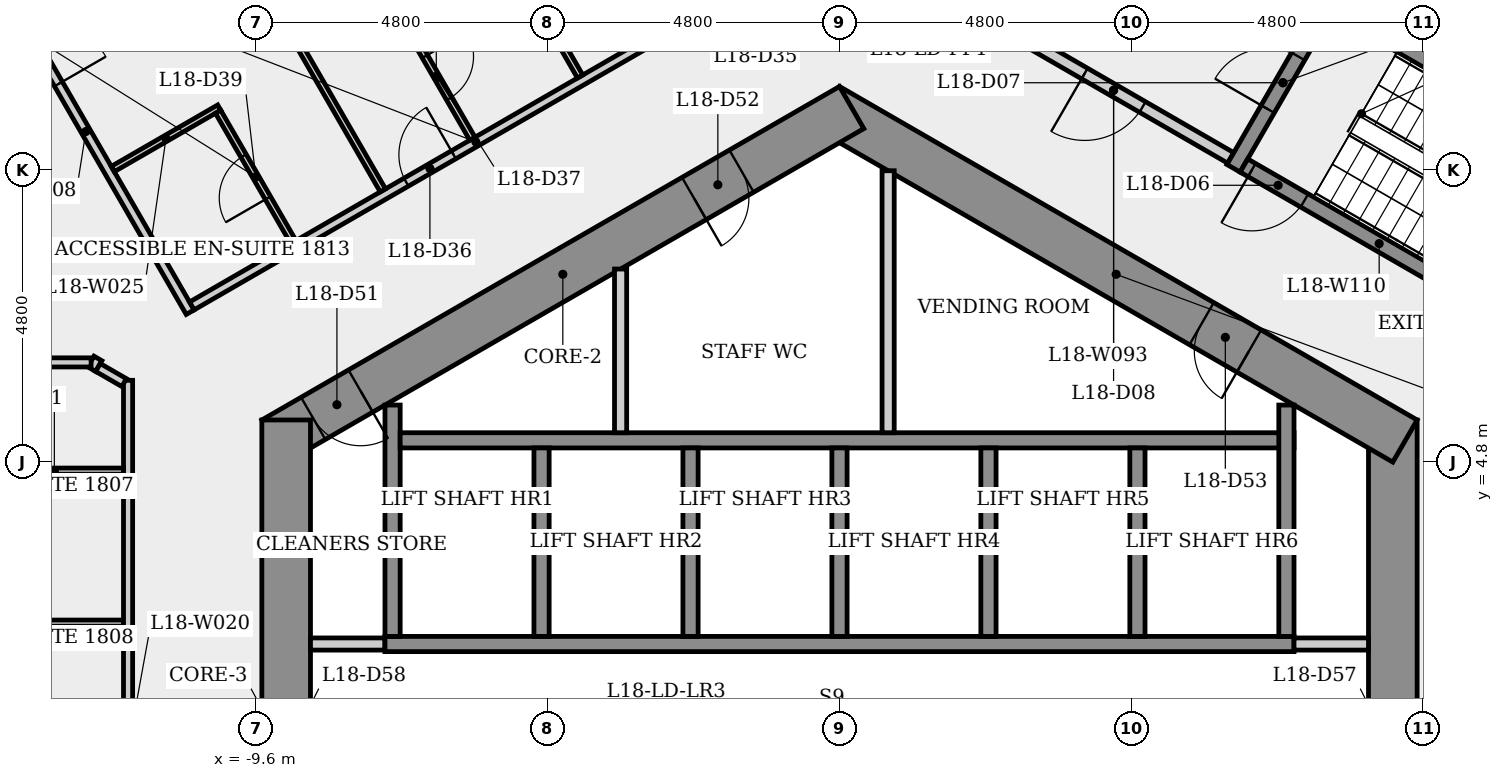
"""IFC4 building model, lengths in metres.
Left out: names, types, materials, properties, quantities, classifications, styles, units other than length and angle.
Written with IfcOpenShell. Run it as: python <this file> out.ifc"""

import sys

from ifc_helpers import new_model, si_unit, direction, frame, frame_2d, origin, place, context, subcontext, project, spatial, rectangle, extrude, element, fill, save


model = new_model("IFC4")
c1 = context("Model", 3, precision=1e-05, world=origin(), true_north=direction((0.0, 1.0)))
c2 = subcontext(c1, "Body", "Model", "MODEL_VIEW")
j1 = project(units=[si_unit("LENGTHUNIT", "METRE"), si_unit("PLANEANGLEUNIT", "RADIAN")], contexts=[c1])
p1 = place(None, origin())
s1 = spatial("IfcSite", under=j1, at=p1, CompositionType="ELEMENT")
p2 = place(p1, origin())
s2 = spatial("IfcBuilding", under=s1, at=p2, CompositionType="ELEMENT")
p3 = place(p2, frame((0.0, 0.0, 70.3)))
s3 = spatial("IfcBuildingStorey", under=s2, at=p3, CompositionType="ELEMENT", Elevation=70.3)
p4 = place(p3, frame((9.1, -5.485, 0.0), z_axis=(0.0, 0.0, 1.0), x_axis=(0.0, 1.0, 0.0)))
e1 = element("IfcWall", 1, at=p4, inside=s3, PredefinedType="SHEAR", context=c2, shape_type="SweptSolid", body=[
    extrude(rectangle(XDim=10.97, YDim=0.8, at=frame_2d((5.485, 0.0))), origin(), (0.0, 0.0, 1.0), 4.0),
])
p5 = place(p4, frame((4.685, 0.0, 0.0)))
e2 = element("IfcOpeningElement", 2, at=p5, cuts=e1, PredefinedType="OPENING", context=c2, shape_type="SweptSolid", body=[
    extrude(rectangle(XDim=1.6, YDim=2.1, at=frame_2d((0.8, 1.05))), frame((0.0, 0.41, 0.0), z_axis=(0.0, -1.0, 0.0), x_axis=(1.0, 0.0, 0.0)), (0.0, 0.0, 1.0), 0.82),
])
p6 = place(p3, frame((9.3, 5.138, 0.0), z_axis=(0.0, 0.0, 1.0), x_axis=(-0.866023993627, 0.500002442456, 0.0)))
e3 = element("IfcWall", 3, at=p6, inside=s3, PredefinedType="SHEAR", context=c2, shape_type="SweptSolid", body=[
    extrude(rectangle(XDim=10.97, YDim=0.8, at=frame_2d((5.485, 0.0))), origin(), (0.0, 0.0, 1.0), 4.0),
])
p7 = place(p6, frame((2.962, 0.0, 0.0)))
e4 = element("IfcOpeningElement", 4, at=p7, cuts=e3, PredefinedType="OPENING", context=c2, shape_type="SweptSolid", body=[
    extrude(rectangle(XDim=0.9, YDim=2.1, at=frame_2d((0.45, 1.05))), frame((0.0, 0.41, 0.0), z_axis=(0.0, -1.0, 0.0), x_axis=(1.0, 0.0, 0.0)), (0.0, 0.0, 1.0), 0.82),
])
p8 = place(p3, frame((0.2, 10.623, 0.0), z_axis=(0.0, 0.0, 1.0), x_axis=(-0.866023993627, -0.500002442456, 0.0)))
e5 = element("IfcWall", 5, at=p8, inside=s3, PredefinedType="SHEAR", context=c2, shape_type="SweptSolid", body=[
    extrude(rectangle(XDim=10.97, YDim=0.8, at=frame_2d((5.485, 0.0))), origin(), (0.0, 0.0, 1.0), 4.0),
])
p9 = place(p8, frame((9.325, 0.0, 0.0)))
e6 = element("IfcOpeningElement", 6, at=p9, cuts=e5, PredefinedType="OPENING", context=c2, shape_type="SweptSolid", body=[
    extrude(rectangle(XDim=0.9, YDim=2.1, at=frame_2d((0.45, 1.05))), frame((0.0, 0.41, 0.0), z_axis=(0.0, -1.0, 0.0), x_axis=(1.0, 0.0, 0.0)), (0.0, 0.0, 1.0), 0.82),
])
p10 = place(p8, frame((2.091, 0.0, 0.0)))
e7 = element("IfcOpeningElement", 7, at=p10, cuts=e5, PredefinedType="OPENING", context=c2, shape_type="SweptSolid", body=[
    extrude(rectangle(XDim=0.9, YDim=2.1, at=frame_2d((0.45, 1.05))), frame((0.0, 0.41, 0.0), z_axis=(0.0, -1.0, 0.0), x_axis=(1.0, 0.0, 0.0)), (0.0, 0.0, 1.0), 0.82),
])
p11 = place(p3, frame((-9.1, 5.485, 0.0), z_axis=(0.0, 0.0, 1.0), x_axis=(0.0, -1.0, 0.0)))
e8 = element("IfcWall", 8, at=p11, inside=s3, PredefinedType="SHEAR", context=c2, shape_type="SweptSolid", body=[
    extrude(rectangle(XDim=10.97, YDim=0.8, at=frame_2d((5.485, 0.0))), origin(), (0.0, 0.0, 1.0), 4.0),
])
p12 = place(p11, frame((4.685, 0.0, 0.0)))
e9 = element("IfcOpeningElement", 9, at=p12, cuts=e8, PredefinedType="OPENING", context=c2, shape_type="SweptSolid", body=[
    extrude(rectangle(XDim=1.6, YDim=2.1, at=frame_2d((0.8, 1.05))), frame((0.0, 0.41, 0.0), z_axis=(0.0, -1.0, 0.0), x_axis=(1.0, 0.0, 0.0)), (0.0, 0.0, 1.0), 0.82),
])
p13 = place(p3, frame((-14.11, 13.2, 0.0), z_axis=(0.0, 0.0, 1.0), x_axis=(0.500007857356, -0.866020867291, 0.0)))
e10 = element("IfcWall", 10, at=p13, inside=s3, PredefinedType="PARTITIONING", context=c2, shape_type="SweptSolid", body=[
    extrude(rectangle(XDim=6.862, YDim=0.15, at=frame_2d((3.431, 0.0))), origin(), (0.0, 0.0, 1.0), 3.6),
])
p14 = place(p13, frame((1.628, 0.0, 0.0)))
e11 = element("IfcOpeningElement", 11, at=p14, cuts=e10, PredefinedType="OPENING", context=c2, shape_type="SweptSolid", body=[
    extrude(rectangle(XDim=0.9, YDim=2.1, at=frame_2d((0.45, 1.05))), frame((0.0, 0.085, 0.0), z_axis=(0.0, -1.0, 0.0), x_axis=(1.0, 0.0, 0.0)), (0.0, 0.0, 1.0), 0.17),
])
p15 = place(p3, frame((-20.003, 2.144, 0.0), z_axis=(0.0, 0.0, 1.0), x_axis=(1.0, 0.0, 0.0)))
e12 = element("IfcWall", 12, at=p15, inside=s3, PredefinedType="PARTITIONING", context=c2, shape_type="SweptSolid", body=[
    extrude(rectangle(XDim=8.228, YDim=0.1, at=frame_2d((4.114, 0.0))), origin(), (0.0, 0.0, 1.0), 3.6),
])
p16 = place(p3, frame((-12.297, 6.32, 0.0), z_axis=(0.0, 0.0, 1.0), x_axis=(0.500137716533, 0.865945878506, 0.0)))
e13 = element("IfcWall", 13, at=p16, inside=s3, PredefinedType="PARTITIONING", context=c2, shape_type="SweptSolid", body=[
    extrude(rectangle(XDim=0.204, YDim=0.15, at=frame_2d((0.102, 0.0))), origin(), (0.0, 0.0, 1.0), 3.6),
])
p17 = place(p3, frame((-12.308, 6.432, 0.0), z_axis=(0.0, 0.0, 1.0), x_axis=(-1.0, 0.0, 0.0)))
e14 = element("IfcWall", 14, at=p17, inside=s3, PredefinedType="PARTITIONING", context=c2, shape_type="SweptSolid", body=[
    extrude(rectangle(XDim=5.709, YDim=0.15, at=frame_2d((2.855, 0.0))), origin(), (0.0, 0.0, 1.0), 3.6),
])
p18 = place(p17, frame((2.405, 0.0, 0.0)))
e15 = element("IfcOpeningElement", 15, at=p18, cuts=e14, PredefinedType="OPENING", context=c2, shape_type="SweptSolid", body=[
    extrude(rectangle(XDim=0.9, YDim=2.1, at=frame_2d((0.45, 1.05))), frame((0.0, 0.085, 0.0), z_axis=(0.0, -1.0, 0.0), x_axis=(1.0, 0.0, 0.0)), (0.0, 0.0, 1.0), 0.17),
])
p19 = place(p3, frame((-11.7, 6.137, 0.0), z_axis=(0.0, 0.0, 1.0), x_axis=(0.0, -1.0, 0.0)))
e16 = element("IfcWall", 16, at=p19, inside=s3, PredefinedType="PARTITIONING", context=c2, shape_type="SweptSolid", body=[
    extrude(rectangle(XDim=12.125, YDim=0.15, at=frame_2d((6.062, 0.0))), origin(), (0.0, 0.0, 1.0), 3.6),
])
p20 = place(p19, frame((6.937, 0.0, 0.0)))
e17 = element("IfcOpeningElement", 17, at=p20, cuts=e16, PredefinedType="OPENING", context=c2, shape_type="SweptSolid", body=[
    extrude(rectangle(XDim=0.9, YDim=2.1, at=frame_2d((0.45, 1.05))), frame((0.0, 0.085, 0.0), z_axis=(0.0, -1.0, 0.0), x_axis=(1.0, 0.0, 0.0)), (0.0, 0.0, 1.0), 0.17),
])
p21 = place(p3, frame((-11.775, 4.644, 0.0), z_axis=(0.0, 0.0, 1.0), x_axis=(-1.0, 0.0, 0.0)))
e18 = element("IfcWall", 18, at=p21, inside=s3, PredefinedType="PARTITIONING", context=c2, shape_type="SweptSolid", body=[
    extrude(rectangle(XDim=2.275, YDim=0.1, at=frame_2d((1.138, 0.0))), origin(), (0.0, 0.0, 1.0), 3.6),
])
p22 = place(p3, frame((-11.765, 6.1, 0.0), z_axis=(0.0, 0.0, 1.0), x_axis=(-0.865964461276, 0.500105540669, 0.0)))
e19 = element("IfcWall", 19, at=p22, inside=s3, PredefinedType="PARTITIONING", context=c2, shape_type="SweptSolid", body=[
    extrude(rectangle(XDim=0.497, YDim=0.15, at=frame_2d((0.248, 0.0))), origin(), (0.0, 0.0, 1.0), 3.6),
])
p23 = place(p3, frame((-10.651, 7.361, 0.0), z_axis=(0.0, 0.0, 1.0), x_axis=(0.866029938532, 0.499992145504, 0.0)))
e20 = element("IfcWall", 20, at=p23, inside=s3, PredefinedType="PARTITIONING", context=c2, shape_type="SweptSolid", body=[
    extrude(rectangle(XDim=10.788, YDim=0.15, at=frame_2d((5.394, 0.0))), origin(), (0.0, 0.0, 1.0), 3.6),
])
p24 = place(p23, frame((4.071, 0.0, 0.0)))
e21 = element("IfcOpeningElement", 21, at=p24, cuts=e20, PredefinedType="OPENING", context=c2, shape_type="SweptSolid", body=[
    extrude(rectangle(XDim=0.9, YDim=2.1, at=frame_2d((0.45, 1.05))), frame((0.0, 0.085, 0.0), z_axis=(0.0, -1.0, 0.0), x_axis=(1.0, 0.0, 0.0)), (0.0, 0.0, 1.0), 0.17),
])
p25 = place(p3, frame((-10.201, 10.623, 0.0), z_axis=(0.0, 0.0, 1.0), x_axis=(-0.866026663364, -0.499997818338, 0.0)))
e22 = element("IfcWall", 22, at=p25, inside=s3, PredefinedType="PARTITIONING", context=c2, shape_type="SweptSolid", body=[
    extrude(rectangle(XDim=2.021, YDim=0.1, at=frame_2d((1.01, 0.0))), origin(), (0.0, 0.0, 1.0), 3.6),
])
p26 = place(p3, frame((-8.982, 8.411, 0.0), z_axis=(0.0, 0.0, 1.0), x_axis=(-0.4999899861, 0.866031185235, 0.0)))
e23 = element("IfcWall", 23, at=p26, inside=s3, PredefinedType="PARTITIONING", context=c2, shape_type="SweptSolid", body=[
    extrude(rectangle(XDim=2.475, YDim=0.1, at=frame_2d((1.238, 0.0))), origin(), (0.0, 0.0, 1.0), 3.6),
])
p27 = place(p26, frame((0.837, 0.0, 0.0)))
e24 = element("IfcOpeningElement", 24, at=p27, cuts=e23, PredefinedType="OPENING", context=c2, shape_type="SweptSolid", body=[
    extrude(rectangle(XDim=0.8, YDim=2.1, at=frame_2d((0.4, 1.05))), frame((0.0, 0.06, 0.0), z_axis=(0.0, -1.0, 0.0), x_axis=(1.0, 0.0, 0.0)), (0.0, 0.0, 1.0), 0.12),
])
p28 = place(p3, frame((-8.7, 1.8, 0.0), z_axis=(0.0, 0.0, 1.0), x_axis=(1.0, 0.0, 0.0)))
e25 = element("IfcWall", 25, at=p28, inside=s3, PredefinedType="PARTITIONING", context=c2, shape_type="SweptSolid", body=[
    extrude(rectangle(XDim=1.225, YDim=0.2, at=frame_2d((0.613, 0.0))), origin(), (0.0, 0.0, 1.0), 3.6),
])
p29 = place(p3, frame((-7.51, 9.261, 0.0), z_axis=(0.0, 0.0, 1.0), x_axis=(-0.500009404554, 0.866019973994, 0.0)))
e26 = element("IfcWall", 26, at=p29, inside=s3, PredefinedType="PARTITIONING", context=c2, shape_type="SweptSolid", body=[
    extrude(rectangle(XDim=9.01, YDim=0.1, at=frame_2d((4.505, 0.0))), origin(), (0.0, 0.0, 1.0), 3.6),
])
p30 = place(p3, frame((-7.475, 1.8, 0.0), z_axis=(0.0, 0.0, 1.0), x_axis=(1.0, 0.0, 0.0)))
e27 = element("IfcWall", 27, at=p30, inside=s3, PredefinedType="SHEAR", context=c2, shape_type="SweptSolid", body=[
    extrude(rectangle(XDim=14.95, YDim=0.25, at=frame_2d((7.475, 0.0))), origin(), (0.0, 0.0, 1.0), 3.6),
])
p31 = place(p3, frame((-7.35, 1.925, 0.0), z_axis=(0.0, 0.0, 1.0), x_axis=(0.0, 1.0, 0.0)))
e28 = element("IfcWall", 28, at=p31, inside=s3, PredefinedType="SHEAR", context=c2, shape_type="SweptSolid", body=[
    extrude(rectangle(XDim=3.805, YDim=0.25, at=frame_2d((1.903, 0.0))), origin(), (0.0, 0.0, 1.0), 3.6),
])
p32 = place(p3, frame((-7.225, 5.15, 0.0), z_axis=(0.0, 0.0, 1.0), x_axis=(1.0, 0.0, 0.0)))
e29 = element("IfcWall", 29, at=p32, inside=s3, PredefinedType="SHEAR", context=c2, shape_type="SweptSolid", body=[
    extrude(rectangle(XDim=14.7, YDim=0.25, at=frame_2d((7.35, 0.0))), origin(), (0.0, 0.0, 1.0), 3.6),
])
p33 = place(p3, frame((-7.225, 12.168, 0.0), z_axis=(0.0, 0.0, 1.0), x_axis=(0.500030943131, -0.866007538022, 0.0)))
e30 = element("IfcWall", 30, at=p33, inside=s3, PredefinedType="PARTITIONING", context=c2, shape_type="SweptSolid", body=[
    extrude(rectangle(XDim=2.375, YDim=0.1, at=frame_2d((1.188, 0.0))), origin(), (0.0, 0.0, 1.0), 3.6),
])
p34 = place(p33, frame((0.812, 0.0, 0.0)))
e31 = element("IfcOpeningElement", 31, at=p34, cuts=e30, PredefinedType="OPENING", context=c2, shape_type="SweptSolid", body=[
    extrude(rectangle(XDim=0.8, YDim=2.1, at=frame_2d((0.4, 1.05))), frame((0.0, 0.06, 0.0), z_axis=(0.0, -1.0, 0.0), x_axis=(1.0, 0.0, 0.0)), (0.0, 0.0, 1.0), 0.12),
])
p35 = place(p3, frame((-8.77, 18.937, 0.0), z_axis=(0.0, 0.0, 1.0), x_axis=(0.499997670926, -0.866026748472, 0.0)))
e32 = element("IfcWall", 32, at=p35, inside=s3, PredefinedType="PARTITIONING", context=c2, shape_type="SweptSolid", body=[
    extrude(rectangle(XDim=9.01, YDim=0.1, at=frame_2d((4.505, 0.0))), origin(), (0.0, 0.0, 1.0), 3.6),
])
p36 = place(p3, frame((-4.9, 5.025, 0.0), z_axis=(0.0, 0.0, 1.0), x_axis=(0.0, -1.0, 0.0)))
e33 = element("IfcWall", 33, at=p36, inside=s3, PredefinedType="SHEAR", context=c2, shape_type="SweptSolid", body=[
    extrude(rectangle(XDim=3.1, YDim=0.25, at=frame_2d((1.55, 0.0))), origin(), (0.0, 0.0, 1.0), 4.0),
])
p37 = place(p3, frame((-3.6, 7.967, 0.0), z_axis=(0.0, 0.0, 1.0), x_axis=(0.0, -1.0, 0.0)))
e34 = element("IfcWall", 34, at=p37, inside=s3, PredefinedType="PARTITIONING", context=c2, shape_type="SweptSolid", body=[
    extrude(rectangle(XDim=2.692, YDim=0.2, at=frame_2d((1.346, 0.0))), origin(), (0.0, 0.0, 1.0), 3.6),
])
for number, where, z_axis, x_axis in (
    (35, (-2.45, 5.025, 0.0), (0.0, 0.0, 1.0), (0.0, -1.0, 0.0)),
    (36, (0.0, 5.025, 0.0), (0.0, 0.0, 1.0), (0.0, -1.0, 0.0)),
):
    element("IfcWall", number, at=place(p3, frame(where, z_axis=z_axis, x_axis=x_axis)), inside=s3, PredefinedType="SHEAR", context=c2, shape_type="SweptSolid", body=[
        extrude(rectangle(XDim=3.1, YDim=0.25, at=frame_2d((1.55, 0.0))), origin(), (0.0, 0.0, 1.0), 4.0),
    ])
p38 = place(p3, frame((0.8, 9.584, 0.0), z_axis=(0.0, 0.0, 1.0), x_axis=(0.0, -1.0, 0.0)))
e37 = element("IfcWall", 37, at=p38, inside=s3, PredefinedType="PARTITIONING", context=c2, shape_type="SweptSolid", body=[
    extrude(rectangle(XDim=4.309, YDim=0.2, at=frame_2d((2.155, 0.0))), origin(), (0.0, 0.0, 1.0), 3.6),
])
for number, where, z_axis, x_axis in (
    (38, (2.45, 5.025, 0.0), (0.0, 0.0, 1.0), (0.0, -1.0, 0.0)),
    (39, (4.9, 5.025, 0.0), (0.0, 0.0, 1.0), (0.0, -1.0, 0.0)),
):
    element("IfcWall", number, at=place(p3, frame(where, z_axis=z_axis, x_axis=x_axis)), inside=s3, PredefinedType="SHEAR", context=c2, shape_type="SweptSolid", body=[
        extrude(rectangle(XDim=3.1, YDim=0.25, at=frame_2d((1.55, 0.0))), origin(), (0.0, 0.0, 1.0), 4.0),
    ])
p39 = place(p3, frame((6.435, 9.795, 0.0), z_axis=(0.0, 0.0, 1.0), x_axis=(-0.866012907634, 0.500021643343, 0.0)))
e40 = element("IfcWall", 40, at=p39, inside=s3, PredefinedType="PARTITIONING", context=c2, shape_type="SweptSolid", body=[
    extrude(rectangle(XDim=4.45, YDim=0.2, at=frame_2d((2.225, 0.0))), origin(), (0.0, 0.0, 1.0), 3.6),
])
p40 = place(p39, frame((1.675, 0.0, 0.0)))
e41 = element("IfcOpeningElement", 41, at=p40, cuts=e40, PredefinedType="OPENING", context=c2, shape_type="SweptSolid", body=[
    extrude(rectangle(XDim=1.1, YDim=2.1, at=frame_2d((0.55, 1.05))), frame((0.0, 0.11, 0.0), z_axis=(0.0, -1.0, 0.0), x_axis=(1.0, 0.0, 0.0)), (0.0, 0.0, 1.0), 0.22),
])
p41 = place(p3, frame((6.48, 9.624, 0.0), z_axis=(0.0, 0.0, 1.0), x_axis=(0.500017246033, 0.866015446554, 0.0)))
e42 = element("IfcWall", 42, at=p41, inside=s3, PredefinedType="SHEAR", context=c2, shape_type="SweptSolid", body=[
    extrude(rectangle(XDim=3.25, YDim=0.25, at=frame_2d((1.625, 0.0))), origin(), (0.0, 0.0, 1.0), 3.6),
])
p42 = place(p41, frame((1.125, 0.0, 0.0)))
e43 = element("IfcOpeningElement", 43, at=p42, cuts=e42, PredefinedType="OPENING", context=c2, shape_type="SweptSolid", body=[
    extrude(rectangle(XDim=1.0, YDim=2.1, at=frame_2d((0.5, 1.05))), frame((0.0, 0.135, 0.0), z_axis=(0.0, -1.0, 0.0), x_axis=(1.0, 0.0, 0.0)), (0.0, 0.0, 1.0), 0.27),
])
p43 = place(p3, frame((7.475, 1.8, 0.0), z_axis=(0.0, 0.0, 1.0), x_axis=(1.0, 0.0, 0.0)))
e44 = element("IfcWall", 44, at=p43, inside=s3, PredefinedType="PARTITIONING", context=c2, shape_type="SweptSolid", body=[
    extrude(rectangle(XDim=1.225, YDim=0.2, at=frame_2d((0.613, 0.0))), origin(), (0.0, 0.0, 1.0), 3.6),
])
p44 = place(p3, frame((7.35, 5.73, 0.0), z_axis=(0.0, 0.0, 1.0), x_axis=(0.0, -1.0, 0.0)))
e45 = element("IfcWall", 45, at=p44, inside=s3, PredefinedType="SHEAR", context=c2, shape_type="SweptSolid", body=[
    extrude(rectangle(XDim=3.805, YDim=0.25, at=frame_2d((1.903, 0.0))), origin(), (0.0, 0.0, 1.0), 3.6),
])
p45 = place(p3, frame((8.151, 12.268, 0.0), z_axis=(0.0, 0.0, 1.0), x_axis=(0.866025499775, -0.499999833739, 0.0)))
e46 = element("IfcWall", 46, at=p45, inside=s3, PredefinedType="SHEAR", context=c2, shape_type="SweptSolid", body=[
    extrude(rectangle(XDim=6.4, YDim=0.25, at=frame_2d((3.2, 0.0))), origin(), (0.0, 0.0, 1.0), 3.6),
])
p46 = place(p3, frame((11.1, 7.101, 0.0), z_axis=(0.0, 0.0, 1.0), x_axis=(-0.8660265141, 0.499998076872, 0.0)))
e47 = element("IfcWall", 47, at=p46, inside=s3, PredefinedType="SHEAR", context=c2, shape_type="SweptSolid", body=[
    extrude(rectangle(XDim=5.137, YDim=0.25, at=frame_2d((2.569, 0.0))), origin(), (0.0, 0.0, 1.0), 3.6),
])
p47 = place(p46, frame((3.987, 0.0, 0.0)))
e48 = element("IfcOpeningElement", 48, at=p47, cuts=e47, PredefinedType="OPENING", context=c2, shape_type="SweptSolid", body=[
    extrude(rectangle(XDim=1.0, YDim=2.1, at=frame_2d((0.5, 1.05))), frame((0.0, 0.135, 0.0), z_axis=(0.0, -1.0, 0.0), x_axis=(1.0, 0.0, 0.0)), (0.0, 0.0, 1.0), 0.27),
])
p48 = place(p47, origin())
e49 = element("IfcDoor", 49, at=p48, inside=s3, OperationType="SINGLE_SWING_RIGHT", PredefinedType="DOOR", context=c2, shape_type="SweptSolid", body=[
    extrude(rectangle(XDim=1.0, YDim=2.1, at=frame_2d((0.5, 1.05))), frame((0.0, 0.025, 0.0), z_axis=(0.0, -1.0, 0.0), x_axis=(1.0, 0.0, 0.0)), (0.0, 0.0, 1.0), 0.05),
])
fill(e48, e49)
p49 = place(p42, origin())
e50 = element("IfcDoor", 50, at=p49, inside=s3, OperationType="SINGLE_SWING_LEFT", PredefinedType="DOOR", context=c2, shape_type="SweptSolid", body=[
    extrude(rectangle(XDim=1.0, YDim=2.1, at=frame_2d((0.5, 1.05))), frame((0.0, 0.025, 0.0), z_axis=(0.0, -1.0, 0.0), x_axis=(1.0, 0.0, 0.0)), (0.0, 0.0, 1.0), 0.05),
])
fill(e43, e50)
p50 = place(p40, origin())
e51 = element("IfcDoor", 51, at=p50, inside=s3, OperationType="SINGLE_SWING_RIGHT", PredefinedType="DOOR", context=c2, shape_type="SweptSolid", body=[
    extrude(rectangle(XDim=1.1, YDim=2.1, at=frame_2d((0.55, 1.05))), frame((0.0, 0.025, 0.0), z_axis=(0.0, -1.0, 0.0), x_axis=(1.0, 0.0, 0.0)), (0.0, 0.0, 1.0), 0.05),
])
fill(e41, e51)
p51 = place(p24, origin())
e52 = element("IfcDoor", 52, at=p51, inside=s3, OperationType="SINGLE_SWING_RIGHT", PredefinedType="DOOR", context=c2, shape_type="SweptSolid", body=[
    extrude(rectangle(XDim=0.9, YDim=2.1, at=frame_2d((0.45, 1.05))), frame((0.0, 0.025, 0.0), z_axis=(0.0, -1.0, 0.0), x_axis=(1.0, 0.0, 0.0)), (0.0, 0.0, 1.0), 0.05),
])
fill(e21, e52)
p52 = place(p34, origin())
e53 = element("IfcDoor", 53, at=p52, inside=s3, OperationType="SINGLE_SWING_LEFT", PredefinedType="DOOR", context=c2, shape_type="SweptSolid", body=[
    extrude(rectangle(XDim=0.8, YDim=2.1, at=frame_2d((0.4, 1.05))), frame((0.0, 0.025, 0.0), z_axis=(0.0, -1.0, 0.0), x_axis=(1.0, 0.0, 0.0)), (0.0, 0.0, 1.0), 0.05),
])
fill(e31, e53)
p53 = place(p14, origin())
e54 = element("IfcDoor", 54, at=p53, inside=s3, OperationType="SINGLE_SWING_RIGHT", PredefinedType="DOOR", context=c2, shape_type="SweptSolid", body=[
    extrude(rectangle(XDim=0.9, YDim=2.1, at=frame_2d((0.45, 1.05))), frame((0.0, 0.025, 0.0), z_axis=(0.0, -1.0, 0.0), x_axis=(1.0, 0.0, 0.0)), (0.0, 0.0, 1.0), 0.05),
])
fill(e11, e54)
p54 = place(p27, origin())
e55 = element("IfcDoor", 55, at=p54, inside=s3, OperationType="SINGLE_SWING_LEFT", PredefinedType="DOOR", context=c2, shape_type="SweptSolid", body=[
    extrude(rectangle(XDim=0.8, YDim=2.1, at=frame_2d((0.4, 1.05))), frame((0.0, 0.025, 0.0), z_axis=(0.0, -1.0, 0.0), x_axis=(1.0, 0.0, 0.0)), (0.0, 0.0, 1.0), 0.05),
])
fill(e24, e55)
p55 = place(p9, origin())
e56 = element("IfcDoor", 56, at=p55, inside=s3, OperationType="SINGLE_SWING_LEFT", PredefinedType="DOOR", context=c2, shape_type="SweptSolid", body=[
    extrude(rectangle(XDim=0.9, YDim=2.1, at=frame_2d((0.45, 1.05))), frame((0.0, 0.025, 0.0), z_axis=(0.0, -1.0, 0.0), x_axis=(1.0, 0.0, 0.0)), (0.0, 0.0, 1.0), 0.05),
])
fill(e6, e56)
p56 = place(p10, origin())
e57 = element("IfcDoor", 57, at=p56, inside=s3, OperationType="SINGLE_SWING_RIGHT", PredefinedType="DOOR", context=c2, shape_type="SweptSolid", body=[
    extrude(rectangle(XDim=0.9, YDim=2.1, at=frame_2d((0.45, 1.05))), frame((0.0, 0.025, 0.0), z_axis=(0.0, -1.0, 0.0), x_axis=(1.0, 0.0, 0.0)), (0.0, 0.0, 1.0), 0.05),
])
fill(e7, e57)
p57 = place(p7, origin())
e58 = element("IfcDoor", 58, at=p57, inside=s3, OperationType="SINGLE_SWING_LEFT", PredefinedType="DOOR", context=c2, shape_type="SweptSolid", body=[
    extrude(rectangle(XDim=0.9, YDim=2.1, at=frame_2d((0.45, 1.05))), frame((0.0, 0.025, 0.0), z_axis=(0.0, -1.0, 0.0), x_axis=(1.0, 0.0, 0.0)), (0.0, 0.0, 1.0), 0.05),
])
fill(e4, e58)
save(model, sys.argv[1])
